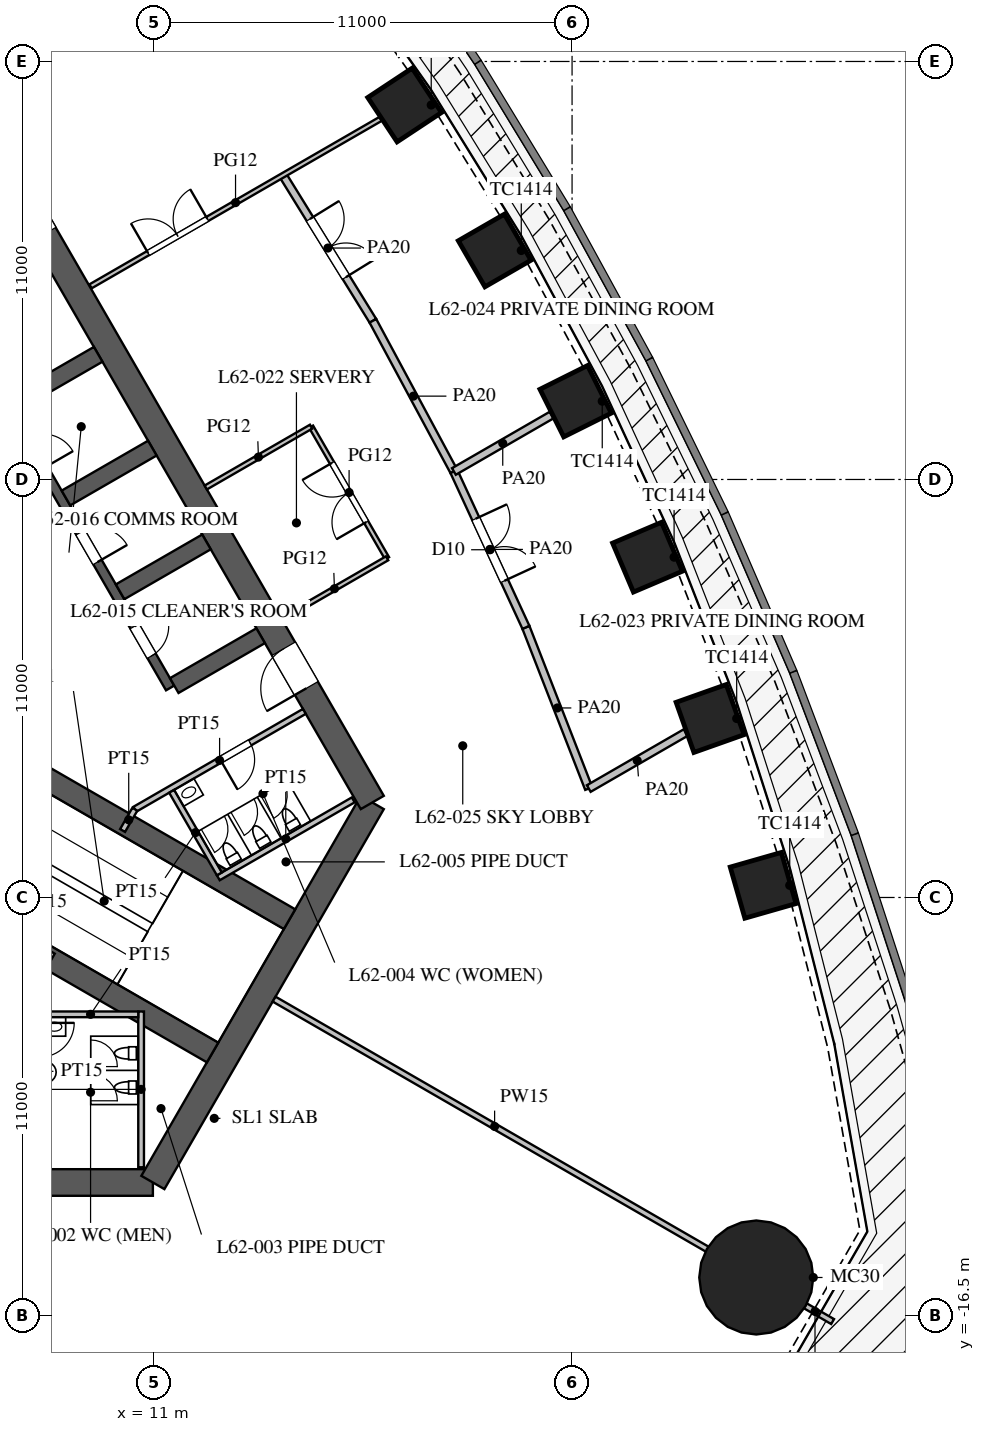
"""IFC4 building model, lengths in metres.
Left out: names, types, materials, properties, quantities, classifications, styles, units other than length and angle.
Written with IfcOpenShell. Run it as: python <this file> out.ifc"""

import sys

from ifc_helpers import new_model, si_unit, direction, frame, frame_2d, origin, origin_2d, place, context, subcontext, project, spatial, rectangle, circle, extrude, element, fill, save


model = new_model("IFC4")
c1 = context("Model", 3, precision=1e-05, world=origin(), true_north=direction((0.0, 1.0)))
c2 = subcontext(c1, "Body", "Model", "MODEL_VIEW")
j1 = project(units=[si_unit("LENGTHUNIT", "METRE"), si_unit("PLANEANGLEUNIT", "RADIAN")], contexts=[c1])
p1 = place(None, origin())
s1 = spatial("IfcSite", under=j1, at=p1, CompositionType="ELEMENT")
p2 = place(p1, origin())
s2 = spatial("IfcBuilding", under=s1, at=p2, CompositionType="ELEMENT")
p3 = place(p2, frame((0.0, 0.0, 271.3)))
s3 = spatial("IfcBuildingStorey", under=s2, at=p3, CompositionType="ELEMENT", Elevation=271.3)
for number, where, z_axis, x_axis in (
    (1, (27.027, -5.18, 0.0), (0.0, 0.0, 1.0), (-0.275, 0.961, 0.0)),
    (2, (25.632, -0.79, 0.0), (0.0, 0.0, 1.0), (-0.334, 0.942, 0.0)),
    (3, (23.985, 3.455, 0.0), (0.0, 0.0, 1.0), (-0.391, 0.92, 0.0)),
    (4, (22.094, 7.56, 0.0), (0.0, 0.0, 1.0), (-0.447, 0.895, 0.0)),
    (5, (19.963, 11.526, 0.0), (0.0, 0.0, 1.0), (-0.5, 0.866, 0.0)),
    (6, (17.594, 15.354, 0.0), (0.0, 0.0, 1.0), (-0.552, 0.834, 0.0)),
):
    element("IfcColumn", number, at=place(p3, frame(where, z_axis=z_axis, x_axis=x_axis)), inside=s3, PredefinedType="COLUMN", context=c2, shape_type="SweptSolid", body=[
        extrude(rectangle(XDim=1.4, YDim=1.4, at=origin_2d()), origin(), (0.0, 0.0, 1.0), 5.0),
    ])
p4 = place(p3, frame((26.847, -15.5, 0.0), z_axis=(0.0, 0.0, 1.0), x_axis=(1.0, 0.0, 0.0)))
e7 = element("IfcColumn", 7, at=p4, inside=s3, PredefinedType="COLUMN", context=c2, shape_type="SweptSolid", body=[
    extrude(circle(Radius=1.5, at=origin_2d()), origin(), (0.0, 0.0, 1.0), 5.0),
])
p5 = place(p3, frame((-10.97, -13.0, 0.0), z_axis=(0.0, 0.0, 1.0), x_axis=(1.0, 0.0, 0.0)))
e8 = element("IfcWall", 8, at=p5, inside=s3, PredefinedType="SHEAR", context=c2, shape_type="SweptSolid", body=[
    extrude(rectangle(XDim=21.939, YDim=0.7, at=frame_2d((10.97, 0.0))), origin(), (0.0, 0.0, 1.0), 5.0),
])
p6 = place(p5, frame((17.27, 0.0, 0.0)))
e9 = element("IfcOpeningElement", 9, at=p6, cuts=e8, PredefinedType="OPENING", context=c2, shape_type="SweptSolid", body=[
    extrude(rectangle(XDim=1.2, YDim=2.1, at=frame_2d((0.6, 1.05))), frame((0.0, 0.36, 0.0), z_axis=(0.0, -1.0, 0.0), x_axis=(1.0, 0.0, 0.0)), (0.0, 0.0, 1.0), 0.72),
])
p7 = place(p5, frame((3.47, 0.0, 0.0)))
e10 = element("IfcOpeningElement", 10, at=p7, cuts=e8, PredefinedType="OPENING", context=c2, shape_type="SweptSolid", body=[
    extrude(rectangle(XDim=1.2, YDim=2.1, at=frame_2d((0.6, 1.05))), frame((0.0, 0.36, 0.0), z_axis=(0.0, -1.0, 0.0), x_axis=(1.0, 0.0, 0.0)), (0.0, 0.0, 1.0), 0.72),
])
p8 = place(p3, frame((10.97, -13.0, 0.0), z_axis=(0.0, 0.0, 1.0), x_axis=(0.499995765644, 0.866027848477, 0.0)))
e11 = element("IfcWall", 11, at=p8, inside=s3, PredefinedType="SHEAR", context=c2, shape_type="SweptSolid", body=[
    extrude(rectangle(XDim=11.547, YDim=0.7, at=frame_2d((5.773, 0.0))), origin(), (0.0, 0.0, 1.0), 5.0),
])
p9 = place(p3, frame((16.743, -3.0, 0.0), z_axis=(0.0, 0.0, 1.0), x_axis=(-0.500002442456, 0.866023993627, 0.0)))
e12 = element("IfcWall", 12, at=p9, inside=s3, PredefinedType="SHEAR", context=c2, shape_type="SweptSolid", body=[
    extrude(rectangle(XDim=21.939, YDim=0.7, at=frame_2d((10.97, 0.0))), origin(), (0.0, 0.0, 1.0), 5.0),
])
p10 = place(p9, frame((17.27, 0.0, 0.0)))
e13 = element("IfcOpeningElement", 13, at=p10, cuts=e12, PredefinedType="OPENING", context=c2, shape_type="SweptSolid", body=[
    extrude(rectangle(XDim=1.2, YDim=2.1, at=frame_2d((0.6, 1.05))), frame((0.0, 0.36, 0.0), z_axis=(0.0, -1.0, 0.0), x_axis=(1.0, 0.0, 0.0)), (0.0, 0.0, 1.0), 0.72),
])
p11 = place(p9, frame((3.47, 0.0, 0.0)))
e14 = element("IfcOpeningElement", 14, at=p11, cuts=e12, PredefinedType="OPENING", context=c2, shape_type="SweptSolid", body=[
    extrude(rectangle(XDim=1.2, YDim=2.1, at=frame_2d((0.6, 1.05))), frame((0.0, 0.36, 0.0), z_axis=(0.0, -1.0, 0.0), x_axis=(1.0, 0.0, 0.0)), (0.0, 0.0, 1.0), 0.72),
])
p12 = place(p3, frame((11.424, 0.014, 0.0), z_axis=(0.0, 0.0, 1.0), x_axis=(-0.500001763848, 0.866024385424, 0.0)))
e15 = element("IfcWall", 15, at=p12, inside=s3, PredefinedType="SHEAR", context=c2, shape_type="SweptSolid", body=[
    extrude(rectangle(XDim=11.4, YDim=0.25, at=frame_2d((5.7, 0.0))), origin(), (0.0, 0.0, 1.0), 5.0),
])
p13 = place(p12, frame((0.975, 0.0, 0.0)))
e16 = element("IfcOpeningElement", 16, at=p13, cuts=e15, PredefinedType="OPENING", context=c2, shape_type="SweptSolid", body=[
    extrude(rectangle(XDim=0.9, YDim=2.1, at=frame_2d((0.45, 1.05))), frame((0.0, 0.135, 0.0), z_axis=(0.0, -1.0, 0.0), x_axis=(1.0, 0.0, 0.0)), (0.0, 0.0, 1.0), 0.27),
])
p14 = place(p12, frame((3.825, 0.0, 0.0)))
e17 = element("IfcOpeningElement", 17, at=p14, cuts=e15, PredefinedType="OPENING", context=c2, shape_type="SweptSolid", body=[
    extrude(rectangle(XDim=0.9, YDim=2.1, at=frame_2d((0.45, 1.05))), frame((0.0, 0.135, 0.0), z_axis=(0.0, -1.0, 0.0), x_axis=(1.0, 0.0, 0.0)), (0.0, 0.0, 1.0), 0.27),
])
p15 = place(p12, frame((6.675, 0.0, 0.0)))
e18 = element("IfcOpeningElement", 18, at=p15, cuts=e15, PredefinedType="OPENING", context=c2, shape_type="SweptSolid", body=[
    extrude(rectangle(XDim=0.9, YDim=2.1, at=frame_2d((0.45, 1.05))), frame((0.0, 0.135, 0.0), z_axis=(0.0, -1.0, 0.0), x_axis=(1.0, 0.0, 0.0)), (0.0, 0.0, 1.0), 0.27),
])
p16 = place(p12, frame((9.525, 0.0, 0.0)))
e19 = element("IfcOpeningElement", 19, at=p16, cuts=e15, PredefinedType="OPENING", context=c2, shape_type="SweptSolid", body=[
    extrude(rectangle(XDim=0.9, YDim=2.1, at=frame_2d((0.45, 1.05))), frame((0.0, 0.135, 0.0), z_axis=(0.0, -1.0, 0.0), x_axis=(1.0, 0.0, 0.0)), (0.0, 0.0, 1.0), 0.27),
])
for number, where, z_axis, x_axis in (
    (20, (11.532, 0.076, 0.0), (0.0, 0.0, 1.0), (0.866, 0.5, 0.0)),
    (21, (10.107, 2.544, 0.0), (0.0, 0.0, 1.0), (0.866, 0.5, 0.0)),
    (22, (8.682, 5.012, 0.0), (0.0, 0.0, 1.0), (0.866, 0.5, 0.0)),
    (23, (7.257, 7.481, 0.0), (0.0, 0.0, 1.0), (0.866, 0.5, 0.0)),
):
    element("IfcWall", number, at=place(p3, frame(where, z_axis=z_axis, x_axis=x_axis)), inside=s3, PredefinedType="SHEAR", context=c2, shape_type="SweptSolid", body=[
        extrude(rectangle(XDim=2.625, YDim=0.45, at=frame_2d((1.312, 0.0))), origin(), (0.0, 0.0, 1.0), 5.0),
    ])
for number, where, z_axis, x_axis in (
    (24, (4.638, -5.016, 0.0), (0.0, 0.0, 1.0), (0.866, -0.5, 0.0)),
    (25, (6.663, -1.509, 0.0), (0.0, 0.0, 1.0), (0.866, -0.5, 0.0)),
):
    element("IfcWall", number, at=place(p3, frame(where, z_axis=z_axis, x_axis=x_axis)), inside=s3, PredefinedType="SHEAR", context=c2, shape_type="SweptSolid", body=[
        extrude(rectangle(XDim=9.125, YDim=0.6, at=frame_2d((4.562, 0.0))), origin(), (0.0, 0.0, 1.0), 5.0),
    ])
p17 = place(p3, frame((30.158, -19.995, 0.0), z_axis=(0.0, 0.0, 1.0), x_axis=(0.49998850867, 0.866032038205, 0.0)))
e26 = element("IfcWall", 26, at=p17, inside=s3, PredefinedType="PARAPET", context=c2, shape_type="SweptSolid", body=[
    extrude(rectangle(XDim=4.475, YDim=0.25, at=frame_2d((2.237, 0.0))), origin(), (0.0, 0.0, 1.0), 1.1),
])
p18 = place(p3, frame((31.618, -11.713, 0.0), z_axis=(0.0, 0.0, 1.0), x_axis=(-0.270257504211, 0.962788077106, 0.0)))
e27 = element("IfcWall", 27, at=p18, inside=s3, PredefinedType="PARAPET", context=c2, shape_type="SweptSolid", body=[
    extrude(rectangle(XDim=3.564, YDim=0.25, at=frame_2d((1.782, 0.0))), origin(), (0.0, 0.0, 1.0), 1.1),
])
p19 = place(p3, frame((30.655, -8.282, 0.0), z_axis=(0.0, 0.0, 1.0), x_axis=(-0.310154105003, 0.950686294815, 0.0)))
e28 = element("IfcWall", 28, at=p19, inside=s3, PredefinedType="PARAPET", context=c2, shape_type="SweptSolid", body=[
    extrude(rectangle(XDim=4.599, YDim=0.25, at=frame_2d((2.3, 0.0))), origin(), (0.0, 0.0, 1.0), 1.1),
])
p20 = place(p3, frame((29.229, -3.909, 0.0), z_axis=(0.0, 0.0, 1.0), x_axis=(-0.354219967303, 0.935162132875, 0.0)))
e29 = element("IfcWall", 29, at=p20, inside=s3, PredefinedType="PARAPET", context=c2, shape_type="SweptSolid", body=[
    extrude(rectangle(XDim=4.559, YDim=0.25, at=frame_2d((2.28, 0.0))), origin(), (0.0, 0.0, 1.0), 1.1),
])
p21 = place(p3, frame((27.614, 0.354, 0.0), z_axis=(0.0, 0.0, 1.0), x_axis=(-0.397253491631, 0.917708920839, 0.0)))
e30 = element("IfcWall", 30, at=p21, inside=s3, PredefinedType="PARAPET", context=c2, shape_type="SweptSolid", body=[
    extrude(rectangle(XDim=4.53, YDim=0.25, at=frame_2d((2.265, 0.0))), origin(), (0.0, 0.0, 1.0), 1.1),
])
p22 = place(p3, frame((25.814, 4.511, 0.0), z_axis=(0.0, 0.0, 1.0), x_axis=(-0.43911984878, 0.898428493764, 0.0)))
e31 = element("IfcWall", 31, at=p22, inside=s3, PredefinedType="PARAPET", context=c2, shape_type="SweptSolid", body=[
    extrude(rectangle(XDim=4.511, YDim=0.25, at=frame_2d((2.255, 0.0))), origin(), (0.0, 0.0, 1.0), 1.1),
])
p23 = place(p3, frame((23.833, 8.564, 0.0), z_axis=(0.0, 0.0, 1.0), x_axis=(-0.479949984371, 0.877295852322, 0.0)))
e32 = element("IfcWall", 32, at=p23, inside=s3, PredefinedType="PARAPET", context=c2, shape_type="SweptSolid", body=[
    extrude(rectangle(XDim=4.501, YDim=0.25, at=frame_2d((2.25, 0.0))), origin(), (0.0, 0.0, 1.0), 1.1),
])
p24 = place(p3, frame((21.673, 12.513, 0.0), z_axis=(0.0, 0.0, 1.0), x_axis=(-0.519790350351, 0.85429385558, 0.0)))
e33 = element("IfcWall", 33, at=p24, inside=s3, PredefinedType="PARAPET", context=c2, shape_type="SweptSolid", body=[
    extrude(rectangle(XDim=4.501, YDim=0.25, at=frame_2d((2.25, 0.0))), origin(), (0.0, 0.0, 1.0), 1.1),
])
p25 = place(p3, frame((19.333, 16.358, 0.0), z_axis=(0.0, 0.0, 1.0), x_axis=(-0.55850386778, 0.829501916619, 0.0)))
e34 = element("IfcWall", 34, at=p25, inside=s3, PredefinedType="PARAPET", context=c2, shape_type="SweptSolid", body=[
    extrude(rectangle(XDim=4.511, YDim=0.25, at=frame_2d((2.255, 0.0))), origin(), (0.0, 0.0, 1.0), 1.1),
])
p26 = place(p3, frame((10.495, -3.178, 0.0), z_axis=(0.0, 0.0, 1.0), x_axis=(0.866037967349, 0.499978238636, 0.0)))
e35 = element("IfcWall", 35, at=p26, inside=s3, PredefinedType="PARTITIONING", context=c2, shape_type="SweptSolid", body=[
    extrude(rectangle(XDim=5.15, YDim=0.15, at=frame_2d((2.575, 0.0))), origin(), (0.0, 0.0, 1.0), 4.8),
])
p27 = place(p26, frame((2.6, 0.0, 0.0)))
e36 = element("IfcOpeningElement", 36, at=p27, cuts=e35, PredefinedType="OPENING", context=c2, shape_type="SweptSolid", body=[
    extrude(rectangle(XDim=0.9, YDim=2.1, at=frame_2d((0.45, 1.05))), frame((0.0, 0.085, 0.0), z_axis=(0.0, -1.0, 0.0), x_axis=(1.0, 0.0, 0.0)), (0.0, 0.0, 1.0), 0.17),
])
for number, where, z_axis, x_axis in (
    (37, (8.0, -7.5, 0.0), (0.0, 0.0, 1.0), (0.5, 0.866, 0.0)),
    (38, (10.495, -3.178, 0.0), (0.0, 0.0, 1.0), (-0.5, -0.866, 0.0)),
):
    element("IfcWall", number, at=place(p3, frame(where, z_axis=z_axis, x_axis=x_axis)), inside=s3, PredefinedType="PARTITIONING", context=c2, shape_type="SweptSolid", body=[
        extrude(rectangle(XDim=0.645, YDim=0.15, at=frame_2d((0.323, 0.0))), origin(), (0.0, 0.0, 1.0), 4.8),
    ])
p28 = place(p3, frame((10.66, -8.5, 0.0), z_axis=(0.0, 0.0, 1.0), x_axis=(0.0, -1.0, 0.0)))
e39 = element("IfcWall", 39, at=p28, inside=s3, PredefinedType="PARTITIONING", context=c2, shape_type="SweptSolid", body=[
    extrude(rectangle(XDim=4.1, YDim=0.15, at=frame_2d((2.05, 0.0))), origin(), (0.0, 0.0, 1.0), 4.8),
])
p29 = place(p3, frame((8.075, -8.575, 0.0), z_axis=(0.0, 0.0, 1.0), x_axis=(1.0, 0.0, 0.0)))
e40 = element("IfcWall", 40, at=p29, inside=s3, PredefinedType="PARTITIONING", context=c2, shape_type="SweptSolid", body=[
    extrude(rectangle(XDim=2.51, YDim=0.15, at=frame_2d((1.255, 0.0))), origin(), (0.0, 0.0, 1.0), 4.8),
])
p30 = place(p3, frame((12.691, -4.982, 0.0), z_axis=(0.0, 0.0, 1.0), x_axis=(0.8660249478, 0.500000789788, 0.0)))
e41 = element("IfcWall", 41, at=p30, inside=s3, PredefinedType="PARTITIONING", context=c2, shape_type="SweptSolid", body=[
    extrude(rectangle(XDim=4.1, YDim=0.15, at=frame_2d((2.05, 0.0))), origin(), (0.0, 0.0, 1.0), 4.8),
])
p31 = place(p3, frame((11.464, -2.706, 0.0), z_axis=(0.0, 0.0, 1.0), x_axis=(0.50001992892, -0.866013897511, 0.0)))
e42 = element("IfcWall", 42, at=p31, inside=s3, PredefinedType="PARTITIONING", context=c2, shape_type="SweptSolid", body=[
    extrude(rectangle(XDim=2.51, YDim=0.15, at=frame_2d((1.255, 0.0))), origin(), (0.0, 0.0, 1.0), 4.8),
])
p32 = place(p3, frame((14.159, -8.175, 0.0), z_axis=(0.0, 0.0, 1.0), x_axis=(0.866026905467, -0.499997399001, 0.0)))
e43 = element("IfcWall", 43, at=p32, inside=s3, PredefinedType="PARTITIONING", context=c2, shape_type="SweptSolid", body=[
    extrude(rectangle(XDim=13.4, YDim=0.15, at=frame_2d((6.7, 0.0))), origin(), (0.0, 0.0, 1.0), 3.3),
])
p33 = place(p3, frame((27.929, -16.125, 0.0), z_axis=(0.0, 0.0, 1.0), x_axis=(0.866086810508, -0.499893625349, 0.0)))
e44 = element("IfcWall", 44, at=p33, inside=s3, PredefinedType="PARTITIONING", context=c2, shape_type="SweptSolid", body=[
    extrude(rectangle(XDim=1.07, YDim=0.15, at=frame_2d((0.535, 0.0))), origin(), (0.0, 0.0, 1.0), 3.3),
])
p34 = place(p3, frame((17.133, 3.425, 0.0), z_axis=(0.0, 0.0, 1.0), x_axis=(-0.49999894854, 0.866026010844, 0.0)))
e45 = element("IfcWall", 45, at=p34, inside=s3, PredefinedType="PARTITIONING", context=c2, shape_type="SweptSolid", body=[
    extrude(rectangle(XDim=4.0, YDim=0.12, at=frame_2d((2.0, 0.0))), origin(), (0.0, 0.0, 1.0), 3.6),
])
p35 = place(p34, frame((1.1, 0.0, 0.0)))
e46 = element("IfcOpeningElement", 46, at=p35, cuts=e45, PredefinedType="OPENING", context=c2, shape_type="SweptSolid", body=[
    extrude(rectangle(XDim=1.8, YDim=2.1, at=frame_2d((0.9, 1.05))), frame((0.0, 0.07, 0.0), z_axis=(0.0, -1.0, 0.0), x_axis=(1.0, 0.0, 0.0)), (0.0, 0.0, 1.0), 0.14),
])
for number, where, z_axis, x_axis in (
    (47, (12.361, 5.289, 0.0), (0.0, 0.0, 1.0), (0.866, 0.5, 0.0)),
    (48, (14.361, 1.825, 0.0), (0.0, 0.0, 1.0), (0.866, 0.5, 0.0)),
):
    element("IfcWall", number, at=place(p3, frame(where, z_axis=z_axis, x_axis=x_axis)), inside=s3, PredefinedType="PARTITIONING", context=c2, shape_type="SweptSolid", body=[
        extrude(rectangle(XDim=3.2, YDim=0.12, at=frame_2d((1.6, 0.0))), origin(), (0.0, 0.0, 1.0), 3.6),
    ])
p36 = place(p3, frame((16.759, 9.676, 0.0), z_axis=(0.0, 0.0, 1.0), x_axis=(-0.525996140194, 0.850486954927, 0.0)))
e49 = element("IfcWall", 49, at=p36, inside=s3, PredefinedType="PARTITIONING", context=c2, shape_type="SweptSolid", body=[
    extrude(rectangle(XDim=4.502, YDim=0.2, at=frame_2d((2.251, 0.0))), origin(), (0.0, 0.0, 1.0), 3.6),
])
p37 = place(p36, frame((1.35, 0.0, 0.0)))
e50 = element("IfcOpeningElement", 50, at=p37, cuts=e49, PredefinedType="OPENING", context=c2, shape_type="SweptSolid", body=[
    extrude(rectangle(XDim=1.8, YDim=2.1, at=frame_2d((0.9, 1.05))), frame((0.0, 0.11, 0.0), z_axis=(0.0, -1.0, 0.0), x_axis=(1.0, 0.0, 0.0)), (0.0, 0.0, 1.0), 0.22),
])
p38 = place(p3, frame((22.439, -2.633, 0.0), z_axis=(0.0, 0.0, 1.0), x_axis=(-0.363212149153, 0.931706463811, 0.0)))
e51 = element("IfcWall", 51, at=p38, inside=s3, PredefinedType="PARTITIONING", context=c2, shape_type="SweptSolid", body=[
    extrude(rectangle(XDim=4.553, YDim=0.2, at=frame_2d((2.276, 0.0))), origin(), (0.0, 0.0, 1.0), 3.6),
])
p39 = place(p3, frame((18.891, 5.71, 0.0), z_axis=(0.0, 0.0, 1.0), x_axis=(-0.473524102582, 0.880780860529, 0.0)))
e52 = element("IfcWall", 52, at=p39, inside=s3, PredefinedType="PARTITIONING", context=c2, shape_type="SweptSolid", body=[
    extrude(rectangle(XDim=4.502, YDim=0.2, at=frame_2d((2.251, 0.0))), origin(), (0.0, 0.0, 1.0), 3.6),
])
p40 = place(p3, frame((20.786, 1.608, 0.0), z_axis=(0.0, 0.0, 1.0), x_axis=(-0.419335693458, 0.907831248742, 0.0)))
e53 = element("IfcWall", 53, at=p40, inside=s3, PredefinedType="PARTITIONING", context=c2, shape_type="SweptSolid", body=[
    extrude(rectangle(XDim=4.519, YDim=0.2, at=frame_2d((2.259, 0.0))), origin(), (0.0, 0.0, 1.0), 3.6),
])
p41 = place(p40, frame((1.35, 0.0, 0.0)))
e54 = element("IfcOpeningElement", 54, at=p41, cuts=e53, PredefinedType="OPENING", context=c2, shape_type="SweptSolid", body=[
    extrude(rectangle(XDim=1.8, YDim=2.1, at=frame_2d((0.9, 1.05))), frame((0.0, 0.11, 0.0), z_axis=(0.0, -1.0, 0.0), x_axis=(1.0, 0.0, 0.0)), (0.0, 0.0, 1.0), 0.22),
])
p42 = place(p3, frame((9.329, 10.582, 0.0), z_axis=(0.0, 0.0, 1.0), x_axis=(0.86602503688, 0.500000635496, 0.0)))
e55 = element("IfcWall", 55, at=p42, inside=s3, PredefinedType="PARTITIONING", context=c2, shape_type="SweptSolid", body=[
    extrude(rectangle(XDim=8.812, YDim=0.12, at=frame_2d((4.406, 0.0))), origin(), (0.0, 0.0, 1.0), 3.4),
])
p43 = place(p42, frame((1.75, 0.0, 0.0)))
e56 = element("IfcOpeningElement", 56, at=p43, cuts=e55, PredefinedType="OPENING", context=c2, shape_type="SweptSolid", body=[
    extrude(rectangle(XDim=1.8, YDim=2.1, at=frame_2d((0.9, 1.05))), frame((0.0, 0.07, 0.0), z_axis=(0.0, -1.0, 0.0), x_axis=(1.0, 0.0, 0.0)), (0.0, 0.0, 1.0), 0.14),
])
p44 = place(p3, frame((22.439, -2.633, 0.0), z_axis=(0.0, 0.0, 1.0), x_axis=(0.866019881867, 0.500009564119, 0.0)))
e57 = element("IfcWall", 57, at=p44, inside=s3, PredefinedType="PARTITIONING", context=c2, shape_type="SweptSolid", body=[
    extrude(rectangle(XDim=2.944, YDim=0.2, at=frame_2d((1.472, 0.0))), origin(), (0.0, 0.0, 1.0), 3.2),
])
p45 = place(p3, frame((18.891, 5.71, 0.0), z_axis=(0.0, 0.0, 1.0), x_axis=(0.866032134716, 0.499988341504, 0.0)))
e58 = element("IfcWall", 58, at=p45, inside=s3, PredefinedType="PARTITIONING", context=c2, shape_type="SweptSolid", body=[
    extrude(rectangle(XDim=2.967, YDim=0.2, at=frame_2d((1.484, 0.0))), origin(), (0.0, 0.0, 1.0), 3.4),
])
p46 = place(p27, frame((0.9, 0.0, 0.0), z_axis=(0.0, 0.0, 1.0), x_axis=(-1.0, 0.0, 0.0)))
e59 = element("IfcDoor", 59, at=p46, inside=s3, OperationType="SINGLE_SWING_RIGHT", PredefinedType="DOOR", context=c2, shape_type="SweptSolid", body=[
    extrude(rectangle(XDim=0.9, YDim=2.1, at=frame_2d((0.45, 1.05))), frame((0.0, 0.025, 0.0), z_axis=(0.0, -1.0, 0.0), x_axis=(1.0, 0.0, 0.0)), (0.0, 0.0, 1.0), 0.05),
])
fill(e36, e59)
p47 = place(p11, origin())
e60 = element("IfcDoor", 60, at=p47, inside=s3, OperationType="SINGLE_SWING_LEFT", PredefinedType="DOOR", context=c2, shape_type="SweptSolid", body=[
    extrude(rectangle(XDim=1.2, YDim=2.1, at=frame_2d((0.6, 1.05))), frame((0.0, 0.025, 0.0), z_axis=(0.0, -1.0, 0.0), x_axis=(1.0, 0.0, 0.0)), (0.0, 0.0, 1.0), 0.05),
])
fill(e14, e60)
p48 = place(p13, frame((0.9, 0.0, 0.0), z_axis=(0.0, 0.0, 1.0), x_axis=(-1.0, 0.0, 0.0)))
e61 = element("IfcDoor", 61, at=p48, inside=s3, OperationType="SINGLE_SWING_LEFT", PredefinedType="DOOR", context=c2, shape_type="SweptSolid", body=[
    extrude(rectangle(XDim=0.9, YDim=2.1, at=frame_2d((0.45, 1.05))), frame((0.0, 0.025, 0.0), z_axis=(0.0, -1.0, 0.0), x_axis=(1.0, 0.0, 0.0)), (0.0, 0.0, 1.0), 0.05),
])
fill(e16, e61)
p49 = place(p14, frame((0.9, 0.0, 0.0), z_axis=(0.0, 0.0, 1.0), x_axis=(-1.0, 0.0, 0.0)))
e62 = element("IfcDoor", 62, at=p49, inside=s3, OperationType="SINGLE_SWING_RIGHT", PredefinedType="DOOR", context=c2, shape_type="SweptSolid", body=[
    extrude(rectangle(XDim=0.9, YDim=2.1, at=frame_2d((0.45, 1.05))), frame((0.0, 0.025, 0.0), z_axis=(0.0, -1.0, 0.0), x_axis=(1.0, 0.0, 0.0)), (0.0, 0.0, 1.0), 0.05),
])
fill(e17, e62)
p50 = place(p43, origin())
e63 = element("IfcDoor", 63, at=p50, inside=s3, OperationType="DOUBLE_DOOR_SINGLE_SWING", PredefinedType="DOOR", context=c2, shape_type="SweptSolid", body=[
    extrude(rectangle(XDim=1.8, YDim=2.1, at=frame_2d((0.9, 1.05))), frame((0.0, 0.025, 0.0), z_axis=(0.0, -1.0, 0.0), x_axis=(1.0, 0.0, 0.0)), (0.0, 0.0, 1.0), 0.05),
])
fill(e56, e63)
p51 = place(p35, origin())
e64 = element("IfcDoor", 64, at=p51, inside=s3, OperationType="DOUBLE_DOOR_SINGLE_SWING", PredefinedType="DOOR", context=c2, shape_type="SweptSolid", body=[
    extrude(rectangle(XDim=1.8, YDim=2.1, at=frame_2d((0.9, 1.05))), frame((0.0, 0.025, 0.0), z_axis=(0.0, -1.0, 0.0), x_axis=(1.0, 0.0, 0.0)), (0.0, 0.0, 1.0), 0.05),
])
fill(e46, e64)
p52 = place(p41, frame((1.8, 0.0, 0.0), z_axis=(0.0, 0.0, 1.0), x_axis=(-1.0, 0.0, 0.0)))
e65 = element("IfcDoor", 65, at=p52, inside=s3, OperationType="DOUBLE_DOOR_SINGLE_SWING", PredefinedType="DOOR", context=c2, shape_type="SweptSolid", body=[
    extrude(rectangle(XDim=1.8, YDim=2.1, at=frame_2d((0.9, 1.05))), frame((0.0, 0.025, 0.0), z_axis=(0.0, -1.0, 0.0), x_axis=(1.0, 0.0, 0.0)), (0.0, 0.0, 1.0), 0.05),
])
fill(e54, e65)
p53 = place(p37, frame((1.8, 0.0, 0.0), z_axis=(0.0, 0.0, 1.0), x_axis=(-1.0, 0.0, 0.0)))
e66 = element("IfcDoor", 66, at=p53, inside=s3, OperationType="DOUBLE_DOOR_SINGLE_SWING", PredefinedType="DOOR", context=c2, shape_type="SweptSolid", body=[
    extrude(rectangle(XDim=1.8, YDim=2.1, at=frame_2d((0.9, 1.05))), frame((0.0, 0.025, 0.0), z_axis=(0.0, -1.0, 0.0), x_axis=(1.0, 0.0, 0.0)), (0.0, 0.0, 1.0), 0.05),
])
fill(e50, e66)
save(model, sys.argv[1])
